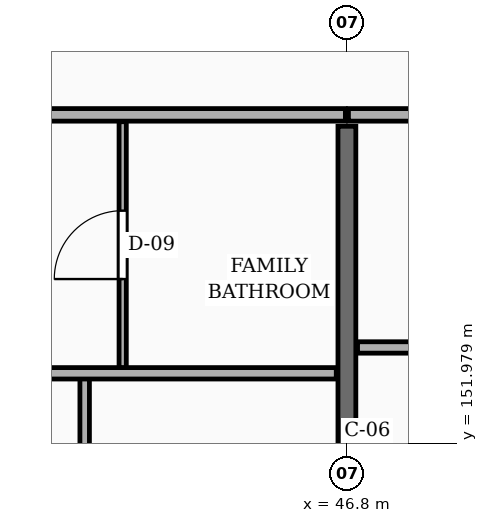
"""IFC4 building model, lengths in metres.
Left out: names, types, materials, properties, quantities, classifications, styles, units other than length and angle.
Written with IfcOpenShell. Run it as: python <this file> out.ifc"""

import sys

from ifc_helpers import new_model, si_unit, direction, frame, frame_2d, origin, place, context, subcontext, project, spatial, rectangle, extrude, element, fill, save


model = new_model("IFC4")
c1 = context("Model", 3, precision=1e-05, world=origin(), true_north=direction((0.0, 1.0)))
c2 = subcontext(c1, "Body", "Model", "MODEL_VIEW")
j1 = project(units=[si_unit("LENGTHUNIT", "METRE"), si_unit("PLANEANGLEUNIT", "RADIAN")], contexts=[c1])
p1 = place(None, origin())
s1 = spatial("IfcSite", under=j1, at=p1, CompositionType="ELEMENT")
p2 = place(p1, origin())
s2 = spatial("IfcBuilding", under=s1, at=p2, CompositionType="ELEMENT")
p3 = place(p2, frame((0.0, 0.0, 20.25)))
s3 = spatial("IfcBuildingStorey", under=s2, at=p3, CompositionType="ELEMENT", Elevation=20.25)
p4 = place(p3, frame((46.8, 144.275, 0.0), z_axis=(0.0, 0.0, 1.0), x_axis=(0.0, 1.0, 0.0)))
e1 = element("IfcWall", 1, at=p4, inside=s3, PredefinedType="SOLIDWALL", context=c2, shape_type="SweptSolid", body=[
    extrude(rectangle(XDim=11.875, YDim=0.235, at=frame_2d((5.938, 0.0))), origin(), (0.0, 0.0, 1.0), 2.185),
])
p5 = place(p3, frame((39.62, 156.3, 0.0), z_axis=(0.0, 0.0, 1.0), x_axis=(1.0, 0.0, 0.0)))
e2 = element("IfcWall", 2, at=p5, inside=s3, PredefinedType="PARTITIONING", context=c2, shape_type="SweptSolid", body=[
    extrude(rectangle(XDim=7.16, YDim=0.165, at=frame_2d((3.58, 0.0))), origin(), (0.0, 0.0, 1.0), 2.32),
])
p6 = place(p5, frame((1.33, 0.0, 0.0)))
e3 = element("IfcOpeningElement", 3, at=p6, cuts=e2, PredefinedType="OPENING", context=c2, shape_type="SweptSolid", body=[
    extrude(rectangle(XDim=1.14, YDim=2.18, at=frame_2d((0.57, 1.09))), frame((0.0, 0.093, 0.0), z_axis=(0.0, -1.0, 0.0), x_axis=(1.0, 0.0, 0.0)), (0.0, 0.0, 1.0), 0.185),
])
p7 = place(p3, frame((46.82, 156.3, 0.0), z_axis=(0.0, 0.0, 1.0), x_axis=(1.0, 0.0, 0.0)))
e4 = element("IfcWall", 4, at=p7, inside=s3, PredefinedType="PARTITIONING", context=c2, shape_type="SweptSolid", body=[
    extrude(rectangle(XDim=7.16, YDim=0.165, at=frame_2d((3.58, 0.0))), origin(), (0.0, 0.0, 1.0), 2.32),
])
p8 = place(p7, frame((1.33, 0.0, 0.0)))
e5 = element("IfcOpeningElement", 5, at=p8, cuts=e4, PredefinedType="OPENING", context=c2, shape_type="SweptSolid", body=[
    extrude(rectangle(XDim=1.0, YDim=2.15, at=frame_2d((0.5, 1.075))), frame((0.0, 0.093, 0.0), z_axis=(0.0, -1.0, 0.0), x_axis=(1.0, 0.0, 0.0)), (0.0, 0.0, 1.0), 0.185),
])
p9 = place(p3, frame((43.35, 144.175, 0.0), z_axis=(0.0, 0.0, 1.0), x_axis=(0.0, 1.0, 0.0)))
e6 = element("IfcWall", 6, at=p9, inside=s3, PredefinedType="PARTITIONING", context=c2, shape_type="SweptSolid", body=[
    extrude(rectangle(XDim=8.655, YDim=0.125, at=frame_2d((4.328, 0.0))), origin(), (0.0, 0.0, 1.0), 2.32),
])
p10 = place(p9, frame((3.877, 0.0, 0.0)))
e7 = element("IfcOpeningElement", 7, at=p10, cuts=e6, PredefinedType="OPENING", context=c2, shape_type="SweptSolid", body=[
    extrude(rectangle(XDim=0.9, YDim=2.1, at=frame_2d((0.45, 1.05))), frame((0.0, 0.073, 0.0), z_axis=(0.0, -1.0, 0.0), x_axis=(1.0, 0.0, 0.0)), (0.0, 0.0, 1.0), 0.145),
])
p11 = place(p3, frame((43.85, 152.97, 0.0), z_axis=(0.0, 0.0, 1.0), x_axis=(0.0, 1.0, 0.0)))
e8 = element("IfcWall", 8, at=p11, inside=s3, PredefinedType="PARTITIONING", context=c2, shape_type="SweptSolid", body=[
    extrude(rectangle(XDim=3.24, YDim=0.095, at=frame_2d((1.62, 0.0))), origin(), (0.0, 0.0, 1.0), 2.32),
])
p12 = place(p11, frame((1.17, 0.0, 0.0)))
e9 = element("IfcOpeningElement", 9, at=p12, cuts=e8, PredefinedType="OPENING", context=c2, shape_type="SweptSolid", body=[
    extrude(rectangle(XDim=0.9, YDim=2.05, at=frame_2d((0.45, 1.025))), frame((0.0, 0.058, 0.0), z_axis=(0.0, -1.0, 0.0), x_axis=(1.0, 0.0, 0.0)), (0.0, 0.0, 1.0), 0.115),
])
p13 = place(p3, frame((39.74, 152.9, 0.0), z_axis=(0.0, 0.0, 1.0), x_axis=(1.0, 0.0, 0.0)))
e10 = element("IfcWall", 10, at=p13, inside=s3, PredefinedType="PARTITIONING", context=c2, shape_type="SweptSolid", body=[
    extrude(rectangle(XDim=6.92, YDim=0.15, at=frame_2d((3.46, 0.0))), origin(), (0.0, 0.0, 1.0), 2.32),
])
p14 = place(p13, frame((1.31, 0.0, 0.0)))
e11 = element("IfcOpeningElement", 11, at=p14, cuts=e10, PredefinedType="OPENING", context=c2, shape_type="SweptSolid", body=[
    extrude(rectangle(XDim=0.95, YDim=2.1, at=frame_2d((0.475, 1.05))), frame((0.0, 0.085, 0.0), z_axis=(0.0, -1.0, 0.0), x_axis=(1.0, 0.0, 0.0)), (0.0, 0.0, 1.0), 0.17),
])
p15 = place(p3, frame((46.94, 153.24, 0.0), z_axis=(0.0, 0.0, 1.0), x_axis=(1.0, 0.0, 0.0)))
e12 = element("IfcWall", 12, at=p15, inside=s3, PredefinedType="PARTITIONING", context=c2, shape_type="SweptSolid", body=[
    extrude(rectangle(XDim=6.92, YDim=0.15, at=frame_2d((3.46, 0.0))), origin(), (0.0, 0.0, 1.0), 2.32),
])
p16 = place(p15, frame((1.31, 0.0, 0.0)))
e13 = element("IfcOpeningElement", 13, at=p16, cuts=e12, PredefinedType="OPENING", context=c2, shape_type="SweptSolid", body=[
    extrude(rectangle(XDim=0.92, YDim=2.1, at=frame_2d((0.46, 1.05))), frame((0.0, 0.085, 0.0), z_axis=(0.0, -1.0, 0.0), x_axis=(1.0, 0.0, 0.0)), (0.0, 0.0, 1.0), 0.17),
])
p17 = place(p12, origin())
e14 = element("IfcDoor", 14, at=p17, inside=s3, OperationType="SINGLE_SWING_LEFT", PredefinedType="DOOR", context=c2, shape_type="SweptSolid", body=[
    extrude(rectangle(XDim=0.9, YDim=2.05, at=frame_2d((0.45, 1.025))), frame((0.0, 0.025, 0.0), z_axis=(0.0, -1.0, 0.0), x_axis=(1.0, 0.0, 0.0)), (0.0, 0.0, 1.0), 0.05),
])
fill(e9, e14)
save(model, sys.argv[1])
